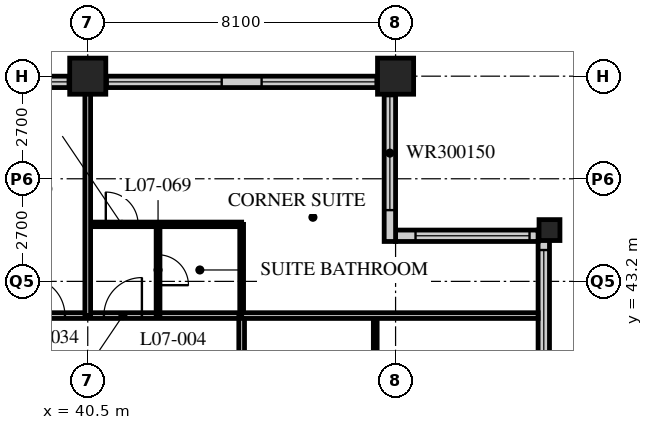
"""IFC4 building model, lengths in metres.
Left out: names, types, materials, properties, quantities, classifications, styles, units other than length and angle.
Written with IfcOpenShell. Run it as: python <this file> out.ifc"""

import sys

from ifc_helpers import new_model, si_unit, direction, frame, frame_2d, origin, origin_2d, place, context, subcontext, project, spatial, rectangle, hollow_rectangle, extrude, element, fill, save


model = new_model("IFC4")
c1 = context("Model", 3, precision=1e-05, world=origin(), true_north=direction((0.0, 1.0)))
c2 = subcontext(c1, "Body", "Model", "MODEL_VIEW")
j1 = project(units=[si_unit("LENGTHUNIT", "METRE"), si_unit("PLANEANGLEUNIT", "RADIAN")], contexts=[c1])
p1 = place(None, origin())
s1 = spatial("IfcSite", under=j1, at=p1, CompositionType="ELEMENT")
p2 = place(p1, origin())
s2 = spatial("IfcBuilding", under=s1, at=p2, CompositionType="ELEMENT")
p3 = place(p2, frame((0.0, 0.0, 36.4)))
s3 = spatial("IfcBuildingStorey", under=s2, at=p3, CompositionType="ELEMENT", Elevation=36.4)
for number, where, z_axis, x_axis in (
    (1, (40.5, 48.6, 0.0), (0.0, 0.0, 1.0), (1.0, 0.0, 0.0)),
    (2, (48.6, 48.6, 0.0), (0.0, 0.0, 1.0), (1.0, 0.0, 0.0)),
):
    element("IfcColumn", number, at=place(p3, frame(where, z_axis=z_axis, x_axis=x_axis)), inside=s3, PredefinedType="COLUMN", context=c2, shape_type="SweptSolid", body=[
        extrude(hollow_rectangle(XDim=0.95, YDim=0.95, WallThickness=0.095, at=origin_2d()), origin(), (0.0, 0.0, 1.0), 3.4),
    ])
p4 = place(p3, frame((52.65, 44.55, 0.0), z_axis=(0.0, 0.0, 1.0), x_axis=(1.0, 0.0, 0.0)))
e3 = element("IfcColumn", 3, at=p4, inside=s3, PredefinedType="COLUMN", context=c2, shape_type="SweptSolid", body=[
    extrude(hollow_rectangle(XDim=0.55, YDim=0.55, WallThickness=0.05, at=origin_2d()), origin(), (0.0, 0.0, 1.0), 3.4),
])
p5 = place(p3, frame((52.5, 40.2, 0.0), z_axis=(0.0, 0.0, 1.0), x_axis=(0.0, 1.0, 0.0)))
e4 = element("IfcWall", 4, at=p5, inside=s3, PredefinedType="SOLIDWALL", context=c2, shape_type="SweptSolid", body=[
    extrude(rectangle(XDim=4.35, YDim=0.3, at=frame_2d((2.175, 0.0))), origin(), (0.0, 0.0, 1.0), 3.19),
])
p6 = place(p5, frame((0.825, 0.0, 0.9)))
e5 = element("IfcOpeningElement", 5, at=p6, cuts=e4, PredefinedType="OPENING", context=c2, shape_type="SweptSolid", body=[
    extrude(rectangle(XDim=3.0, YDim=1.5, at=frame_2d((1.5, 0.75))), frame((0.0, 0.16, 0.0), z_axis=(0.0, -1.0, 0.0), x_axis=(1.0, 0.0, 0.0)), (0.0, 0.0, 1.0), 0.32),
])
p7 = place(p3, frame((52.35, 44.4, 0.0), z_axis=(0.0, 0.0, 1.0), x_axis=(-1.0, 0.0, 0.0)))
e6 = element("IfcWall", 6, at=p7, inside=s3, PredefinedType="SOLIDWALL", context=c2, shape_type="SweptSolid", body=[
    extrude(rectangle(XDim=3.75, YDim=0.3, at=frame_2d((1.875, 0.0))), origin(), (0.0, 0.0, 1.0), 3.19),
])
p8 = place(p7, frame((0.225, 0.0, 0.9)))
e7 = element("IfcOpeningElement", 7, at=p8, cuts=e6, PredefinedType="OPENING", context=c2, shape_type="SweptSolid", body=[
    extrude(rectangle(XDim=3.0, YDim=1.5, at=frame_2d((1.5, 0.75))), frame((0.0, 0.16, 0.0), z_axis=(0.0, -1.0, 0.0), x_axis=(1.0, 0.0, 0.0)), (0.0, 0.0, 1.0), 0.32),
])
p9 = place(p3, frame((48.45, 44.25, 0.0), z_axis=(0.0, 0.0, 1.0), x_axis=(0.0, 1.0, 0.0)))
e8 = element("IfcWall", 8, at=p9, inside=s3, PredefinedType="SOLIDWALL", context=c2, shape_type="SweptSolid", body=[
    extrude(rectangle(XDim=4.35, YDim=0.3, at=frame_2d((2.175, 0.0))), origin(), (0.0, 0.0, 1.0), 3.19),
])
p10 = place(p9, frame((0.825, 0.0, 0.9)))
e9 = element("IfcOpeningElement", 9, at=p10, cuts=e8, PredefinedType="OPENING", context=c2, shape_type="SweptSolid", body=[
    extrude(rectangle(XDim=3.0, YDim=1.5, at=frame_2d((1.5, 0.75))), frame((0.0, 0.16, 0.0), z_axis=(0.0, -1.0, 0.0), x_axis=(1.0, 0.0, 0.0)), (0.0, 0.0, 1.0), 0.32),
])
p11 = place(p3, frame((48.3, 48.45, 0.0), z_axis=(0.0, 0.0, 1.0), x_axis=(-1.0, 0.0, 0.0)))
e10 = element("IfcWall", 10, at=p11, inside=s3, PredefinedType="SOLIDWALL", context=c2, shape_type="SweptSolid", body=[
    extrude(rectangle(XDim=40.2, YDim=0.3, at=frame_2d((20.1, 0.0))), origin(), (0.0, 0.0, 1.0), 3.19),
])
p12 = place(p11, frame((0.225, 0.0, 0.9)))
e11 = element("IfcOpeningElement", 11, at=p12, cuts=e10, PredefinedType="OPENING", context=c2, shape_type="SweptSolid", body=[
    extrude(rectangle(XDim=3.0, YDim=2.0, at=frame_2d((1.5, 1.0))), frame((0.0, 0.16, 0.0), z_axis=(0.0, -1.0, 0.0), x_axis=(1.0, 0.0, 0.0)), (0.0, 0.0, 1.0), 0.32),
])
p13 = place(p11, frame((4.275, 0.0, 0.9)))
e12 = element("IfcOpeningElement", 12, at=p13, cuts=e10, PredefinedType="OPENING", context=c2, shape_type="SweptSolid", body=[
    extrude(rectangle(XDim=3.0, YDim=2.0, at=frame_2d((1.5, 1.0))), frame((0.0, 0.16, 0.0), z_axis=(0.0, -1.0, 0.0), x_axis=(1.0, 0.0, 0.0)), (0.0, 0.0, 1.0), 0.32),
])
p14 = place(p11, frame((8.325, 0.0, 0.9)))
e13 = element("IfcOpeningElement", 13, at=p14, cuts=e10, PredefinedType="OPENING", context=c2, shape_type="SweptSolid", body=[
    extrude(rectangle(XDim=3.0, YDim=2.0, at=frame_2d((1.5, 1.0))), frame((0.0, 0.16, 0.0), z_axis=(0.0, -1.0, 0.0), x_axis=(1.0, 0.0, 0.0)), (0.0, 0.0, 1.0), 0.32),
])
p15 = place(p11, frame((12.375, 0.0, 0.9)))
e14 = element("IfcOpeningElement", 14, at=p15, cuts=e10, PredefinedType="OPENING", context=c2, shape_type="SweptSolid", body=[
    extrude(rectangle(XDim=3.0, YDim=2.0, at=frame_2d((1.5, 1.0))), frame((0.0, 0.16, 0.0), z_axis=(0.0, -1.0, 0.0), x_axis=(1.0, 0.0, 0.0)), (0.0, 0.0, 1.0), 0.32),
])
p16 = place(p11, frame((16.425, 0.0, 0.9)))
e15 = element("IfcOpeningElement", 15, at=p16, cuts=e10, PredefinedType="OPENING", context=c2, shape_type="SweptSolid", body=[
    extrude(rectangle(XDim=3.0, YDim=2.0, at=frame_2d((1.5, 1.0))), frame((0.0, 0.16, 0.0), z_axis=(0.0, -1.0, 0.0), x_axis=(1.0, 0.0, 0.0)), (0.0, 0.0, 1.0), 0.32),
])
p17 = place(p11, frame((20.475, 0.0, 0.9)))
e16 = element("IfcOpeningElement", 16, at=p17, cuts=e10, PredefinedType="OPENING", context=c2, shape_type="SweptSolid", body=[
    extrude(rectangle(XDim=3.0, YDim=2.0, at=frame_2d((1.5, 1.0))), frame((0.0, 0.16, 0.0), z_axis=(0.0, -1.0, 0.0), x_axis=(1.0, 0.0, 0.0)), (0.0, 0.0, 1.0), 0.32),
])
p18 = place(p11, frame((24.525, 0.0, 0.9)))
e17 = element("IfcOpeningElement", 17, at=p18, cuts=e10, PredefinedType="OPENING", context=c2, shape_type="SweptSolid", body=[
    extrude(rectangle(XDim=3.0, YDim=2.0, at=frame_2d((1.5, 1.0))), frame((0.0, 0.16, 0.0), z_axis=(0.0, -1.0, 0.0), x_axis=(1.0, 0.0, 0.0)), (0.0, 0.0, 1.0), 0.32),
])
p19 = place(p11, frame((28.575, 0.0, 0.9)))
e18 = element("IfcOpeningElement", 18, at=p19, cuts=e10, PredefinedType="OPENING", context=c2, shape_type="SweptSolid", body=[
    extrude(rectangle(XDim=3.0, YDim=2.0, at=frame_2d((1.5, 1.0))), frame((0.0, 0.16, 0.0), z_axis=(0.0, -1.0, 0.0), x_axis=(1.0, 0.0, 0.0)), (0.0, 0.0, 1.0), 0.32),
])
p20 = place(p11, frame((32.625, 0.0, 0.9)))
e19 = element("IfcOpeningElement", 19, at=p20, cuts=e10, PredefinedType="OPENING", context=c2, shape_type="SweptSolid", body=[
    extrude(rectangle(XDim=3.0, YDim=2.0, at=frame_2d((1.5, 1.0))), frame((0.0, 0.16, 0.0), z_axis=(0.0, -1.0, 0.0), x_axis=(1.0, 0.0, 0.0)), (0.0, 0.0, 1.0), 0.32),
])
p21 = place(p11, frame((36.675, 0.0, 0.9)))
e20 = element("IfcOpeningElement", 20, at=p21, cuts=e10, PredefinedType="OPENING", context=c2, shape_type="SweptSolid", body=[
    extrude(rectangle(XDim=3.0, YDim=2.0, at=frame_2d((1.5, 1.0))), frame((0.0, 0.16, 0.0), z_axis=(0.0, -1.0, 0.0), x_axis=(1.0, 0.0, 0.0)), (0.0, 0.0, 1.0), 0.32),
])
p22 = place(p3, frame((12.15, 42.3, 0.0), z_axis=(0.0, 0.0, 1.0), x_axis=(1.0, 0.0, 0.0)))
e21 = element("IfcWall", 21, at=p22, inside=s3, PredefinedType="PARTITIONING", context=c2, shape_type="SweptSolid", body=[
    extrude(rectangle(XDim=32.4, YDim=0.15, at=frame_2d((16.2, 0.0))), origin(), (0.0, 0.0, 1.0), 3.19),
])
p23 = place(p22, frame((6.5, 0.0, 0.0)))
e22 = element("IfcOpeningElement", 22, at=p23, cuts=e21, PredefinedType="OPENING", context=c2, shape_type="SweptSolid", body=[
    extrude(rectangle(XDim=1.0, YDim=2.1, at=frame_2d((0.5, 1.05))), frame((0.0, 0.085, 0.0), z_axis=(0.0, -1.0, 0.0), x_axis=(1.0, 0.0, 0.0)), (0.0, 0.0, 1.0), 0.17),
])
p24 = place(p22, frame((8.4, 0.0, 0.0)))
e23 = element("IfcOpeningElement", 23, at=p24, cuts=e21, PredefinedType="OPENING", context=c2, shape_type="SweptSolid", body=[
    extrude(rectangle(XDim=1.0, YDim=2.1, at=frame_2d((0.5, 1.05))), frame((0.0, 0.085, 0.0), z_axis=(0.0, -1.0, 0.0), x_axis=(1.0, 0.0, 0.0)), (0.0, 0.0, 1.0), 0.17),
])
p25 = place(p22, frame((14.6, 0.0, 0.0)))
e24 = element("IfcOpeningElement", 24, at=p25, cuts=e21, PredefinedType="OPENING", context=c2, shape_type="SweptSolid", body=[
    extrude(rectangle(XDim=1.0, YDim=2.1, at=frame_2d((0.5, 1.05))), frame((0.0, 0.085, 0.0), z_axis=(0.0, -1.0, 0.0), x_axis=(1.0, 0.0, 0.0)), (0.0, 0.0, 1.0), 0.17),
])
p26 = place(p22, frame((18.65, 0.0, 0.0)))
e25 = element("IfcOpeningElement", 25, at=p26, cuts=e21, PredefinedType="OPENING", context=c2, shape_type="SweptSolid", body=[
    extrude(rectangle(XDim=1.0, YDim=2.1, at=frame_2d((0.5, 1.05))), frame((0.0, 0.085, 0.0), z_axis=(0.0, -1.0, 0.0), x_axis=(1.0, 0.0, 0.0)), (0.0, 0.0, 1.0), 0.17),
])
p27 = place(p22, frame((23.0, 0.0, 0.0)))
e26 = element("IfcOpeningElement", 26, at=p27, cuts=e21, PredefinedType="OPENING", context=c2, shape_type="SweptSolid", body=[
    extrude(rectangle(XDim=1.0, YDim=2.1, at=frame_2d((0.5, 1.05))), frame((0.0, 0.085, 0.0), z_axis=(0.0, -1.0, 0.0), x_axis=(1.0, 0.0, 0.0)), (0.0, 0.0, 1.0), 0.17),
])
p28 = place(p22, frame((26.75, 0.0, 0.0)))
e27 = element("IfcOpeningElement", 27, at=p28, cuts=e21, PredefinedType="OPENING", context=c2, shape_type="SweptSolid", body=[
    extrude(rectangle(XDim=1.0, YDim=2.1, at=frame_2d((0.5, 1.05))), frame((0.0, 0.085, 0.0), z_axis=(0.0, -1.0, 0.0), x_axis=(1.0, 0.0, 0.0)), (0.0, 0.0, 1.0), 0.17),
])
p29 = place(p22, frame((28.775, 0.0, 0.0)))
e28 = element("IfcOpeningElement", 28, at=p29, cuts=e21, PredefinedType="OPENING", context=c2, shape_type="SweptSolid", body=[
    extrude(rectangle(XDim=1.0, YDim=2.1, at=frame_2d((0.5, 1.05))), frame((0.0, 0.085, 0.0), z_axis=(0.0, -1.0, 0.0), x_axis=(1.0, 0.0, 0.0)), (0.0, 0.0, 1.0), 0.17),
])
p30 = place(p22, frame((2.625, 0.0, 0.0)))
e29 = element("IfcOpeningElement", 29, at=p30, cuts=e21, PredefinedType="OPENING", context=c2, shape_type="SweptSolid", body=[
    extrude(rectangle(XDim=1.0, YDim=2.1, at=frame_2d((0.5, 1.05))), frame((0.0, 0.085, 0.0), z_axis=(0.0, -1.0, 0.0), x_axis=(1.0, 0.0, 0.0)), (0.0, 0.0, 1.0), 0.17),
])
p31 = place(p3, frame((44.55, 16.2, 0.0), z_axis=(0.0, 0.0, 1.0), x_axis=(0.0, 1.0, 0.0)))
e30 = element("IfcWall", 30, at=p31, inside=s3, PredefinedType="PARTITIONING", context=c2, shape_type="SweptSolid", body=[
    extrude(rectangle(XDim=26.1, YDim=0.15, at=frame_2d((13.05, 0.0))), origin(), (0.0, 0.0, 1.0), 3.19),
])
p32 = place(p31, frame((2.75, 0.0, 0.0)))
e31 = element("IfcOpeningElement", 31, at=p32, cuts=e30, PredefinedType="OPENING", context=c2, shape_type="SweptSolid", body=[
    extrude(rectangle(XDim=1.0, YDim=2.1, at=frame_2d((0.5, 1.05))), frame((0.0, 0.085, 0.0), z_axis=(0.0, -1.0, 0.0), x_axis=(1.0, 0.0, 0.0)), (0.0, 0.0, 1.0), 0.17),
])
p33 = place(p31, frame((4.35, 0.0, 0.0)))
e32 = element("IfcOpeningElement", 32, at=p33, cuts=e30, PredefinedType="OPENING", context=c2, shape_type="SweptSolid", body=[
    extrude(rectangle(XDim=1.0, YDim=2.1, at=frame_2d((0.5, 1.05))), frame((0.0, 0.085, 0.0), z_axis=(0.0, -1.0, 0.0), x_axis=(1.0, 0.0, 0.0)), (0.0, 0.0, 1.0), 0.17),
])
p34 = place(p31, frame((8.4, 0.0, 0.0)))
e33 = element("IfcOpeningElement", 33, at=p34, cuts=e30, PredefinedType="OPENING", context=c2, shape_type="SweptSolid", body=[
    extrude(rectangle(XDim=1.0, YDim=2.1, at=frame_2d((0.5, 1.05))), frame((0.0, 0.085, 0.0), z_axis=(0.0, -1.0, 0.0), x_axis=(1.0, 0.0, 0.0)), (0.0, 0.0, 1.0), 0.17),
])
p35 = place(p31, frame((14.6, 0.0, 0.0)))
e34 = element("IfcOpeningElement", 34, at=p35, cuts=e30, PredefinedType="OPENING", context=c2, shape_type="SweptSolid", body=[
    extrude(rectangle(XDim=1.0, YDim=2.1, at=frame_2d((0.5, 1.05))), frame((0.0, 0.085, 0.0), z_axis=(0.0, -1.0, 0.0), x_axis=(1.0, 0.0, 0.0)), (0.0, 0.0, 1.0), 0.17),
])
p36 = place(p31, frame((18.65, 0.0, 0.0)))
e35 = element("IfcOpeningElement", 35, at=p36, cuts=e30, PredefinedType="OPENING", context=c2, shape_type="SweptSolid", body=[
    extrude(rectangle(XDim=1.0, YDim=2.1, at=frame_2d((0.5, 1.05))), frame((0.0, 0.085, 0.0), z_axis=(0.0, -1.0, 0.0), x_axis=(1.0, 0.0, 0.0)), (0.0, 0.0, 1.0), 0.17),
])
p37 = place(p31, frame((22.65, 0.0, 0.0)))
e36 = element("IfcOpeningElement", 36, at=p37, cuts=e30, PredefinedType="OPENING", context=c2, shape_type="SweptSolid", body=[
    extrude(rectangle(XDim=1.0, YDim=2.1, at=frame_2d((0.5, 1.05))), frame((0.0, 0.085, 0.0), z_axis=(0.0, -1.0, 0.0), x_axis=(1.0, 0.0, 0.0)), (0.0, 0.0, 1.0), 0.17),
])
p38 = place(p3, frame((48.065, 40.0, 0.0), z_axis=(0.0, 0.0, 1.0), x_axis=(0.0, 1.0, 0.0)))
e37 = element("IfcWall", 37, at=p38, inside=s3, PredefinedType="PARTITIONING", context=c2, shape_type="SweptSolid", body=[
    extrude(rectangle(XDim=2.3, YDim=0.1, at=frame_2d((1.15, 0.0))), origin(), (0.0, 0.0, 1.0), 3.19),
])
p39 = place(p3, frame((40.5, 44.7, 0.0), z_axis=(0.0, 0.0, 1.0), x_axis=(1.0, 0.0, 0.0)))
e38 = element("IfcWall", 38, at=p39, inside=s3, PredefinedType="PARTITIONING", context=c2, shape_type="SweptSolid", body=[
    extrude(rectangle(XDim=4.05, YDim=0.12, at=frame_2d((2.025, 0.0))), origin(), (0.0, 0.0, 1.0), 3.19),
])
p40 = place(p39, frame((0.475, 0.0, 0.0)))
e39 = element("IfcOpeningElement", 39, at=p40, cuts=e38, PredefinedType="OPENING", context=c2, shape_type="SweptSolid", body=[
    extrude(rectangle(XDim=0.85, YDim=2.1, at=frame_2d((0.425, 1.05))), frame((0.0, 0.07, 0.0), z_axis=(0.0, -1.0, 0.0), x_axis=(1.0, 0.0, 0.0)), (0.0, 0.0, 1.0), 0.14),
])
p41 = place(p3, frame((42.35, 42.3, 0.0), z_axis=(0.0, 0.0, 1.0), x_axis=(0.0, 1.0, 0.0)))
e40 = element("IfcWall", 40, at=p41, inside=s3, PredefinedType="PARTITIONING", context=c2, shape_type="SweptSolid", body=[
    extrude(rectangle(XDim=2.4, YDim=0.1, at=frame_2d((1.2, 0.0))), origin(), (0.0, 0.0, 1.0), 3.19),
])
p42 = place(p41, frame((0.8, 0.0, 0.0)))
e41 = element("IfcOpeningElement", 41, at=p42, cuts=e40, PredefinedType="OPENING", context=c2, shape_type="SweptSolid", body=[
    extrude(rectangle(XDim=0.8, YDim=2.1, at=frame_2d((0.4, 1.05))), frame((0.0, 0.06, 0.0), z_axis=(0.0, -1.0, 0.0), x_axis=(1.0, 0.0, 0.0)), (0.0, 0.0, 1.0), 0.12),
])
p43 = place(p3, frame((44.55, 42.3, 0.0), z_axis=(0.0, 0.0, 1.0), x_axis=(0.0, 1.0, 0.0)))
e42 = element("IfcWall", 42, at=p43, inside=s3, PredefinedType="PARTITIONING", context=c2, shape_type="SweptSolid", body=[
    extrude(rectangle(XDim=2.4, YDim=0.1, at=frame_2d((1.2, 0.0))), origin(), (0.0, 0.0, 1.0), 3.19),
])
p44 = place(p3, frame((44.55, 42.3, 0.0), z_axis=(0.0, 0.0, 1.0), x_axis=(1.0, 0.0, 0.0)))
e43 = element("IfcWall", 43, at=p44, inside=s3, PredefinedType="PARTITIONING", context=c2, shape_type="SweptSolid", body=[
    extrude(rectangle(XDim=7.8, YDim=0.15, at=frame_2d((3.9, 0.0))), origin(), (0.0, 0.0, 1.0), 3.19),
])
p45 = place(p3, frame((40.5, 42.3, 0.0), z_axis=(0.0, 0.0, 1.0), x_axis=(0.0, 1.0, 0.0)))
e44 = element("IfcWall", 44, at=p45, inside=s3, PredefinedType="PARTITIONING", context=c2, shape_type="SweptSolid", body=[
    extrude(rectangle(XDim=6.0, YDim=0.15, at=frame_2d((3.0, 0.0))), origin(), (0.0, 0.0, 1.0), 2.578),
])
p46 = place(p6, origin())
e45 = element("IfcWindow", 45, at=p46, inside=s3, PartitioningType="SINGLE_PANEL", PredefinedType="WINDOW", context=c2, shape_type="SweptSolid", body=[
    extrude(rectangle(XDim=3.0, YDim=1.5, at=frame_2d((1.5, 0.75))), frame((0.0, 0.03, 0.0), z_axis=(0.0, -1.0, 0.0), x_axis=(1.0, 0.0, 0.0)), (0.0, 0.0, 1.0), 0.06),
])
fill(e5, e45)
p47 = place(p8, origin())
e46 = element("IfcWindow", 46, at=p47, inside=s3, PartitioningType="SINGLE_PANEL", PredefinedType="WINDOW", context=c2, shape_type="SweptSolid", body=[
    extrude(rectangle(XDim=3.0, YDim=1.5, at=frame_2d((1.5, 0.75))), frame((0.0, 0.03, 0.0), z_axis=(0.0, -1.0, 0.0), x_axis=(1.0, 0.0, 0.0)), (0.0, 0.0, 1.0), 0.06),
])
fill(e7, e46)
p48 = place(p10, origin())
e47 = element("IfcWindow", 47, at=p48, inside=s3, PartitioningType="SINGLE_PANEL", PredefinedType="WINDOW", context=c2, shape_type="SweptSolid", body=[
    extrude(rectangle(XDim=3.0, YDim=1.5, at=frame_2d((1.5, 0.75))), frame((0.0, 0.03, 0.0), z_axis=(0.0, -1.0, 0.0), x_axis=(1.0, 0.0, 0.0)), (0.0, 0.0, 1.0), 0.06),
])
fill(e9, e47)
p49 = place(p12, origin())
e48 = element("IfcWindow", 48, at=p49, inside=s3, PartitioningType="SINGLE_PANEL", PredefinedType="WINDOW", context=c2, shape_type="SweptSolid", body=[
    extrude(rectangle(XDim=3.0, YDim=2.0, at=frame_2d((1.5, 1.0))), frame((0.0, 0.03, 0.0), z_axis=(0.0, -1.0, 0.0), x_axis=(1.0, 0.0, 0.0)), (0.0, 0.0, 1.0), 0.06),
])
fill(e11, e48)
p50 = place(p13, origin())
e49 = element("IfcWindow", 49, at=p50, inside=s3, PartitioningType="SINGLE_PANEL", PredefinedType="WINDOW", context=c2, shape_type="SweptSolid", body=[
    extrude(rectangle(XDim=3.0, YDim=2.0, at=frame_2d((1.5, 1.0))), frame((0.0, 0.03, 0.0), z_axis=(0.0, -1.0, 0.0), x_axis=(1.0, 0.0, 0.0)), (0.0, 0.0, 1.0), 0.06),
])
fill(e12, e49)
p51 = place(p14, origin())
e50 = element("IfcWindow", 50, at=p51, inside=s3, PartitioningType="SINGLE_PANEL", PredefinedType="WINDOW", context=c2, shape_type="SweptSolid", body=[
    extrude(rectangle(XDim=3.0, YDim=2.0, at=frame_2d((1.5, 1.0))), frame((0.0, 0.03, 0.0), z_axis=(0.0, -1.0, 0.0), x_axis=(1.0, 0.0, 0.0)), (0.0, 0.0, 1.0), 0.06),
])
fill(e13, e50)
p52 = place(p28, origin())
e51 = element("IfcDoor", 51, at=p52, inside=s3, OperationType="SINGLE_SWING_LEFT", PredefinedType="DOOR", context=c2, shape_type="SweptSolid", body=[
    extrude(rectangle(XDim=1.0, YDim=2.1, at=frame_2d((0.5, 1.05))), frame((0.0, 0.025, 0.0), z_axis=(0.0, -1.0, 0.0), x_axis=(1.0, 0.0, 0.0)), (0.0, 0.0, 1.0), 0.05),
])
fill(e27, e51)
p53 = place(p42, origin())
e52 = element("IfcDoor", 52, at=p53, inside=s3, OperationType="SINGLE_SWING_RIGHT", PredefinedType="DOOR", context=c2, shape_type="SweptSolid", body=[
    extrude(rectangle(XDim=0.8, YDim=2.1, at=frame_2d((0.4, 1.05))), frame((0.0, 0.025, 0.0), z_axis=(0.0, -1.0, 0.0), x_axis=(1.0, 0.0, 0.0)), (0.0, 0.0, 1.0), 0.05),
])
fill(e41, e52)
p54 = place(p29, origin())
e53 = element("IfcDoor", 53, at=p54, inside=s3, OperationType="SINGLE_SWING_RIGHT", PredefinedType="DOOR", context=c2, shape_type="SweptSolid", body=[
    extrude(rectangle(XDim=1.0, YDim=2.1, at=frame_2d((0.5, 1.05))), frame((0.0, 0.025, 0.0), z_axis=(0.0, -1.0, 0.0), x_axis=(1.0, 0.0, 0.0)), (0.0, 0.0, 1.0), 0.05),
])
fill(e28, e53)
p55 = place(p40, origin())
e54 = element("IfcDoor", 54, at=p55, inside=s3, OperationType="SINGLE_SWING_LEFT", PredefinedType="DOOR", context=c2, shape_type="SweptSolid", body=[
    extrude(rectangle(XDim=0.85, YDim=2.1, at=frame_2d((0.425, 1.05))), frame((0.0, 0.025, 0.0), z_axis=(0.0, -1.0, 0.0), x_axis=(1.0, 0.0, 0.0)), (0.0, 0.0, 1.0), 0.05),
])
fill(e39, e54)
save(model, sys.argv[1])
